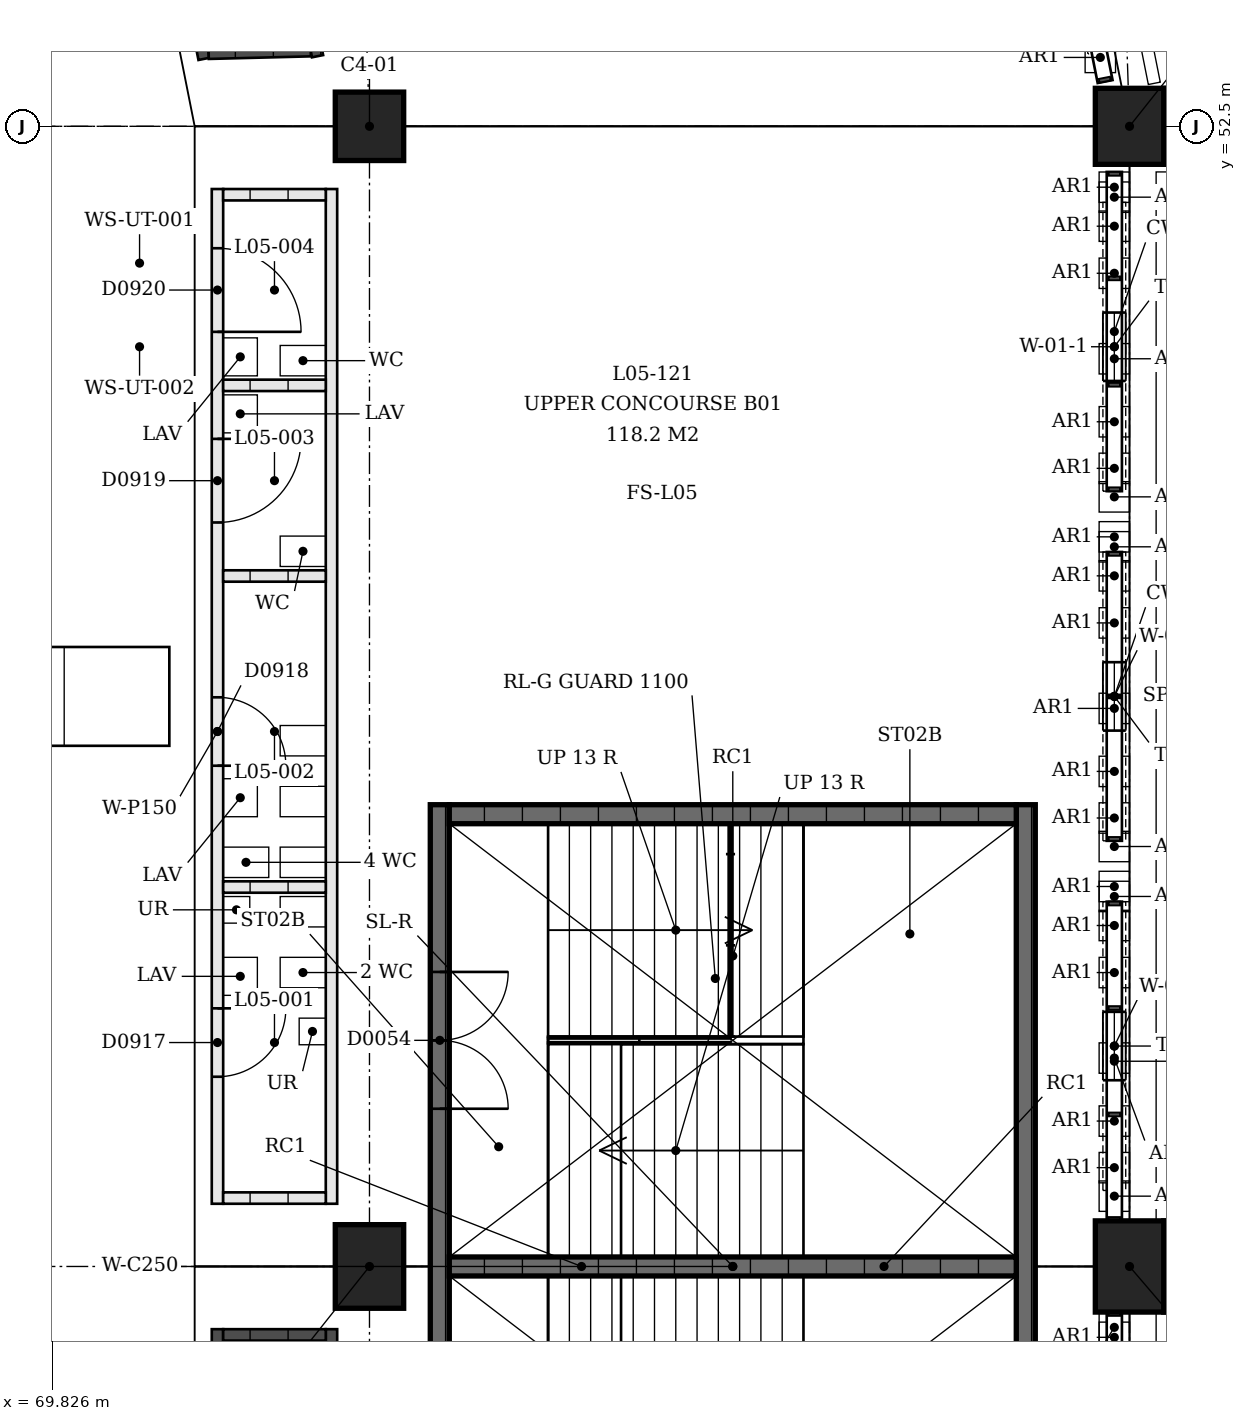
"""IFC4 building model, lengths in metres.
Left out: names, types, materials, properties, quantities, classifications, styles, units other than length and angle.
Written with IfcOpenShell. Run it as: python <this file> out.ifc"""

import sys

from ifc_helpers import new_model, si_unit, direction, frame, frame_2d, origin, origin_2d, place, context, subcontext, project, spatial, polyline, rectangle, outline, extrude, element, fill, save


model = new_model("IFC4")
c1 = context("Model", 3, precision=1e-05, world=origin(), true_north=direction((0.0, 1.0)))
c2 = subcontext(c1, "Body", "Model", "MODEL_VIEW")
j1 = project(units=[si_unit("LENGTHUNIT", "METRE"), si_unit("PLANEANGLEUNIT", "RADIAN")], contexts=[c1])
p1 = place(None, origin())
s1 = spatial("IfcSite", under=j1, at=p1, CompositionType="ELEMENT")
p2 = place(p1, origin())
s2 = spatial("IfcBuilding", under=s1, at=p2, CompositionType="ELEMENT")
p3 = place(p2, frame((0.0, 0.0, 22.5)))
s3 = spatial("IfcBuildingStorey", under=s2, at=p3, CompositionType="ELEMENT", Elevation=22.5)
p4 = place(p3, frame((74.0, 52.5, 0.0), z_axis=(0.0, 0.0, 1.0), x_axis=(0.0, 1.0, 0.0)))
e1 = element("IfcColumn", 1, at=p4, inside=s3, PredefinedType="COLUMN", context=c2, shape_type="SweptSolid", body=[
    extrude(rectangle(XDim=0.9, YDim=0.9, at=origin_2d()), origin(), (0.0, 0.0, 1.0), 6.5),
])
p5 = place(p3, frame((84.0, 52.5, 0.0), z_axis=(0.0, 0.0, 1.0), x_axis=(0.0, 1.0, 0.0)))
e2 = element("IfcColumn", 2, at=p5, inside=s3, PredefinedType="COLUMN", context=c2, shape_type="SweptSolid", body=[
    extrude(rectangle(XDim=1.0, YDim=0.9, at=origin_2d()), origin(), (0.0, 0.0, 1.0), 6.5),
])
p6 = place(p3, frame((74.0, 37.5, 0.0), z_axis=(0.0, 0.0, 1.0), x_axis=(0.0, 1.0, 0.0)))
e3 = element("IfcColumn", 3, at=p6, inside=s3, PredefinedType="COLUMN", context=c2, shape_type="SweptSolid", body=[
    extrude(rectangle(XDim=1.1, YDim=0.9, at=origin_2d()), origin(), (0.0, 0.0, 1.0), 6.5),
])
p7 = place(p3, frame((84.0, 37.5, 0.0), z_axis=(0.0, 0.0, 1.0), x_axis=(0.0, 1.0, 0.0)))
e4 = element("IfcColumn", 4, at=p7, inside=s3, PredefinedType="COLUMN", context=c2, shape_type="SweptSolid", body=[
    extrude(rectangle(XDim=1.2, YDim=0.9, at=origin_2d()), origin(), (0.0, 0.0, 1.0), 6.5),
])
p8 = place(p3, frame((83.8, 51.5, 4.1), z_axis=(0.0, 0.0, 1.0), x_axis=(0.0, -1.0, 0.0)))
e5 = element("IfcWall", 5, at=p8, inside=s3, PredefinedType="SOLIDWALL", context=c2, shape_type="SweptSolid", body=[
    extrude(outline(polyline([(0.0, 0.0), (3.8, 0.0), (3.8, 0.05), (3.676, 1.314), (3.308, 2.581), (2.709, 3.757), (1.9, 4.8), (1.091, 3.757), (0.492, 2.581), (0.124, 1.314), (0.0, 0.05), (0.0, 0.0)])), frame((0.0, 0.15, 0.0), z_axis=(0.0, -1.0, 0.0), x_axis=(1.0, 0.0, 0.0)), (0.0, 0.0, 1.0), 0.3),
])
p9 = place(p8, frame((1.45, 0.0, 0.4)))
e6 = element("IfcOpeningElement", 6, at=p9, cuts=e5, PredefinedType="OPENING", context=c2, shape_type="SweptSolid", body=[
    extrude(rectangle(XDim=0.9, YDim=3.6, at=frame_2d((0.45, 1.8))), frame((0.0, 0.16, 0.0), z_axis=(0.0, -1.0, 0.0), x_axis=(1.0, 0.0, 0.0)), (0.0, 0.0, 1.0), 0.32),
])
p10 = place(p3, frame((83.8, 46.9, 4.1), z_axis=(0.0, 0.0, 1.0), x_axis=(0.0, -1.0, 0.0)))
e7 = element("IfcWall", 7, at=p10, inside=s3, PredefinedType="SOLIDWALL", context=c2, shape_type="SweptSolid", body=[
    extrude(outline(polyline([(0.0, 0.0), (3.8, 0.0), (3.8, 0.05), (3.676, 1.314), (3.308, 2.581), (2.709, 3.757), (1.9, 4.8), (1.091, 3.757), (0.492, 2.581), (0.124, 1.314), (0.0, 0.05), (0.0, 0.0)])), frame((0.0, 0.15, 0.0), z_axis=(0.0, -1.0, 0.0), x_axis=(1.0, 0.0, 0.0)), (0.0, 0.0, 1.0), 0.3),
])
p11 = place(p10, frame((1.45, 0.0, 0.4)))
e8 = element("IfcOpeningElement", 8, at=p11, cuts=e7, PredefinedType="OPENING", context=c2, shape_type="SweptSolid", body=[
    extrude(rectangle(XDim=0.9, YDim=3.6, at=frame_2d((0.45, 1.8))), frame((0.0, 0.16, 0.0), z_axis=(0.0, -1.0, 0.0), x_axis=(1.0, 0.0, 0.0)), (0.0, 0.0, 1.0), 0.32),
])
p12 = place(p3, frame((83.8, 42.3, 4.1), z_axis=(0.0, 0.0, 1.0), x_axis=(0.0, -1.0, 0.0)))
e9 = element("IfcWall", 9, at=p12, inside=s3, PredefinedType="SOLIDWALL", context=c2, shape_type="SweptSolid", body=[
    extrude(outline(polyline([(0.0, 0.0), (3.8, 0.0), (3.8, 0.05), (3.676, 1.314), (3.308, 2.581), (2.709, 3.757), (1.9, 4.8), (1.091, 3.757), (0.492, 2.581), (0.124, 1.314), (0.0, 0.05), (0.0, 0.0)])), frame((0.0, 0.15, 0.0), z_axis=(0.0, -1.0, 0.0), x_axis=(1.0, 0.0, 0.0)), (0.0, 0.0, 1.0), 0.3),
])
p13 = place(p12, frame((1.45, 0.0, 0.4)))
e10 = element("IfcOpeningElement", 10, at=p13, cuts=e9, PredefinedType="OPENING", context=c2, shape_type="SweptSolid", body=[
    extrude(rectangle(XDim=0.9, YDim=3.6, at=frame_2d((0.45, 1.8))), frame((0.0, 0.16, 0.0), z_axis=(0.0, -1.0, 0.0), x_axis=(1.0, 0.0, 0.0)), (0.0, 0.0, 1.0), 0.32),
])
p14 = place(p3, frame((82.868, 57.166, 4.1), z_axis=(0.0, 0.0, 1.0), x_axis=(0.195078797665, -0.980787572669, 0.0)))
e11 = element("IfcWall", 11, at=p14, inside=s3, PredefinedType="SOLIDWALL", context=c2, shape_type="SweptSolid", body=[
    extrude(outline(polyline([(0.0, 0.0), (3.757, 0.0), (3.757, 0.05), (3.635, 1.311), (3.271, 2.577), (2.678, 3.754), (1.879, 4.8), (1.079, 3.754), (0.486, 2.577), (0.123, 1.311), (0.0, 0.05), (0.0, 0.0)])), frame((0.0, 0.15, 0.0), z_axis=(0.0, -1.0, 0.0), x_axis=(1.0, 0.0, 0.0)), (0.0, 0.0, 1.0), 0.3),
])
p15 = place(p14, frame((1.428, 0.0, 0.4)))
e12 = element("IfcOpeningElement", 12, at=p15, cuts=e11, PredefinedType="OPENING", context=c2, shape_type="SweptSolid", body=[
    extrude(rectangle(XDim=0.9, YDim=3.6, at=frame_2d((0.45, 1.8))), frame((0.0, 0.16, 0.0), z_axis=(0.0, -1.0, 0.0), x_axis=(1.0, 0.0, 0.0)), (0.0, 0.0, 1.0), 0.32),
])
p16 = place(p3, frame((74.925, 31.425, 0.0), z_axis=(0.0, 0.0, 1.0), x_axis=(0.0, 1.0, 0.0)))
e13 = element("IfcWall", 13, at=p16, inside=s3, PredefinedType="SHEAR", context=c2, shape_type="SweptSolid", body=[
    extrude(rectangle(XDim=12.15, YDim=0.25, at=frame_2d((6.075, 0.0))), origin(), (0.0, 0.0, 1.0), 2.1),
])
p17 = place(p16, frame((2.2, 0.0, 0.0)))
e14 = element("IfcOpeningElement", 14, at=p17, cuts=e13, PredefinedType="OPENING", context=c2, shape_type="SweptSolid", body=[
    extrude(rectangle(XDim=1.8, YDim=2.1, at=frame_2d((0.9, 1.05))), frame((0.0, 0.125, 0.0), z_axis=(0.0, -1.0, 0.0), x_axis=(1.0, 0.0, 0.0)), (0.0, 0.0, 1.0), 0.25),
])
p18 = place(p16, frame((8.15, 0.0, 0.0)))
e15 = element("IfcOpeningElement", 15, at=p18, cuts=e13, PredefinedType="OPENING", context=c2, shape_type="SweptSolid", body=[
    extrude(rectangle(XDim=1.8, YDim=2.1, at=frame_2d((0.9, 1.05))), frame((0.0, 0.125, 0.0), z_axis=(0.0, -1.0, 0.0), x_axis=(1.0, 0.0, 0.0)), (0.0, 0.0, 1.0), 0.25),
])
p19 = place(p3, frame((82.635, 31.425, 0.0), z_axis=(0.0, 0.0, 1.0), x_axis=(0.0, 1.0, 0.0)))
e16 = element("IfcWall", 16, at=p19, inside=s3, PredefinedType="SHEAR", context=c2, shape_type="SweptSolid", body=[
    extrude(rectangle(XDim=12.15, YDim=0.25, at=frame_2d((6.075, 0.0))), origin(), (0.0, 0.0, 1.0), 2.1),
])
for number, where, z_axis, x_axis in (
    (17, (75.05, 43.45, 0.0), (0.0, 0.0, 1.0), (1.0, 0.0, 0.0)),
    (18, (75.05, 37.5, 0.0), (0.0, 0.0, 1.0), (1.0, 0.0, 0.0)),
):
    element("IfcWall", number, at=place(p3, frame(where, z_axis=z_axis, x_axis=x_axis)), inside=s3, PredefinedType="SHEAR", context=c2, shape_type="SweptSolid", body=[
        extrude(rectangle(XDim=7.46, YDim=0.25, at=frame_2d((3.73, 0.0))), origin(), (0.0, 0.0, 1.0), 2.1),
    ])
p20 = place(p3, frame((72.0, 38.325, 0.0), z_axis=(0.0, 0.0, 1.0), x_axis=(0.0, 1.0, 0.0)))
e19 = element("IfcWall", 19, at=p20, inside=s3, PredefinedType="PARTITIONING", context=c2, shape_type="SweptSolid", body=[
    extrude(rectangle(XDim=13.35, YDim=0.15, at=frame_2d((6.675, 0.0))), origin(), (0.0, 0.0, 1.0), 3.0),
])
p21 = place(p20, frame((1.671, 0.0, 0.0)))
e20 = element("IfcOpeningElement", 20, at=p21, cuts=e19, PredefinedType="OPENING", context=c2, shape_type="SweptSolid", body=[
    extrude(rectangle(XDim=0.9, YDim=2.1, at=frame_2d((0.45, 1.05))), frame((0.0, 0.075, 0.0), z_axis=(0.0, -1.0, 0.0), x_axis=(1.0, 0.0, 0.0)), (0.0, 0.0, 1.0), 0.15),
])
p22 = place(p20, frame((5.763, 0.0, 0.0)))
e21 = element("IfcOpeningElement", 21, at=p22, cuts=e19, PredefinedType="OPENING", context=c2, shape_type="SweptSolid", body=[
    extrude(rectangle(XDim=0.9, YDim=2.1, at=frame_2d((0.45, 1.05))), frame((0.0, 0.075, 0.0), z_axis=(0.0, -1.0, 0.0), x_axis=(1.0, 0.0, 0.0)), (0.0, 0.0, 1.0), 0.15),
])
p23 = place(p20, frame((8.963, 0.0, 0.0)))
e22 = element("IfcOpeningElement", 22, at=p23, cuts=e19, PredefinedType="OPENING", context=c2, shape_type="SweptSolid", body=[
    extrude(rectangle(XDim=1.1, YDim=2.1, at=frame_2d((0.55, 1.05))), frame((0.0, 0.075, 0.0), z_axis=(0.0, -1.0, 0.0), x_axis=(1.0, 0.0, 0.0)), (0.0, 0.0, 1.0), 0.15),
])
p24 = place(p20, frame((11.471, 0.0, 0.0)))
e23 = element("IfcOpeningElement", 23, at=p24, cuts=e19, PredefinedType="OPENING", context=c2, shape_type="SweptSolid", body=[
    extrude(rectangle(XDim=1.1, YDim=2.1, at=frame_2d((0.55, 1.05))), frame((0.0, 0.075, 0.0), z_axis=(0.0, -1.0, 0.0), x_axis=(1.0, 0.0, 0.0)), (0.0, 0.0, 1.0), 0.15),
])
p25 = place(p3, frame((73.5, 38.325, 0.0), z_axis=(0.0, 0.0, 1.0), x_axis=(0.0, 1.0, 0.0)))
e24 = element("IfcWall", 24, at=p25, inside=s3, PredefinedType="PARTITIONING", context=c2, shape_type="SweptSolid", body=[
    extrude(rectangle(XDim=13.35, YDim=0.15, at=frame_2d((6.675, 0.0))), origin(), (0.0, 0.0, 1.0), 3.0),
])
for number, where, z_axis, x_axis in (
    (25, (72.075, 38.4, 0.0), (0.0, 0.0, 1.0), (1.0, 0.0, 0.0)),
    (26, (72.075, 42.492, 0.0), (0.0, 0.0, 1.0), (1.0, 0.0, 0.0)),
    (27, (72.075, 46.584, 0.0), (0.0, 0.0, 1.0), (1.0, 0.0, 0.0)),
    (28, (72.075, 49.092, 0.0), (0.0, 0.0, 1.0), (1.0, 0.0, 0.0)),
    (29, (72.075, 51.6, 0.0), (0.0, 0.0, 1.0), (1.0, 0.0, 0.0)),
):
    element("IfcWall", number, at=place(p3, frame(where, z_axis=z_axis, x_axis=x_axis)), inside=s3, PredefinedType="PARTITIONING", context=c2, shape_type="SweptSolid", body=[
        extrude(rectangle(XDim=1.35, YDim=0.15, at=frame_2d((0.675, 0.0))), origin(), (0.0, 0.0, 1.0), 3.0),
    ])
p26 = place(p3, frame((72.0, 36.675, 0.0), z_axis=(0.0, 0.0, 1.0), x_axis=(0.0, -1.0, 0.0)))
e30 = element("IfcWall", 30, at=p26, inside=s3, PredefinedType="SOLIDWALL", context=c2, shape_type="SweptSolid", body=[
    extrude(rectangle(XDim=13.35, YDim=0.15, at=frame_2d((6.675, 0.0))), origin(), (0.0, 0.0, 1.0), 3.0),
])
p27 = place(p26, frame((2.875, 0.0, 0.0)))
e31 = element("IfcOpeningElement", 31, at=p27, cuts=e30, PredefinedType="OPENING", context=c2, shape_type="SweptSolid", body=[
    extrude(rectangle(XDim=1.0, YDim=2.1, at=frame_2d((0.5, 1.05))), frame((0.0, 0.075, 0.0), z_axis=(0.0, -1.0, 0.0), x_axis=(1.0, 0.0, 0.0)), (0.0, 0.0, 1.0), 0.15),
])
p28 = place(p26, frame((9.475, 0.0, 0.0)))
e32 = element("IfcOpeningElement", 32, at=p28, cuts=e30, PredefinedType="OPENING", context=c2, shape_type="SweptSolid", body=[
    extrude(rectangle(XDim=1.0, YDim=2.1, at=frame_2d((0.5, 1.05))), frame((0.0, 0.075, 0.0), z_axis=(0.0, -1.0, 0.0), x_axis=(1.0, 0.0, 0.0)), (0.0, 0.0, 1.0), 0.15),
])
p29 = place(p3, frame((73.5, 36.675, 0.0), z_axis=(0.0, 0.0, 1.0), x_axis=(0.0, -1.0, 0.0)))
e33 = element("IfcWall", 33, at=p29, inside=s3, PredefinedType="SOLIDWALL", context=c2, shape_type="SweptSolid", body=[
    extrude(rectangle(XDim=13.35, YDim=0.15, at=frame_2d((6.675, 0.0))), origin(), (0.0, 0.0, 1.0), 3.0),
])
p30 = place(p3, frame((72.075, 36.6, 0.0), z_axis=(0.0, 0.0, 1.0), x_axis=(1.0, 0.0, 0.0)))
e34 = element("IfcWall", 34, at=p30, inside=s3, PredefinedType="SOLIDWALL", context=c2, shape_type="SweptSolid", body=[
    extrude(rectangle(XDim=1.35, YDim=0.15, at=frame_2d((0.675, 0.0))), origin(), (0.0, 0.0, 1.0), 3.0),
])
p31 = place(p3, frame((69.265, 66.249, 0.0), z_axis=(0.0, 0.0, 1.0), x_axis=(0.195095631841, -0.980784224198, 0.0)))
e35 = element("IfcWall", 35, at=p31, inside=s3, PredefinedType="SOLIDWALL", context=c2, shape_type="SweptSolid", body=[
    extrude(rectangle(XDim=13.113, YDim=0.15, at=frame_2d((6.557, 0.0))), origin(), (0.0, 0.0, 1.0), 3.0),
])
p32 = place(p31, frame((2.815, 0.0, 0.0)))
e36 = element("IfcOpeningElement", 36, at=p32, cuts=e35, PredefinedType="OPENING", context=c2, shape_type="SweptSolid", body=[
    extrude(rectangle(XDim=1.0, YDim=2.1, at=frame_2d((0.5, 1.05))), frame((0.0, 0.075, 0.0), z_axis=(0.0, -1.0, 0.0), x_axis=(1.0, 0.0, 0.0)), (0.0, 0.0, 1.0), 0.15),
])
p33 = place(p31, frame((9.298, 0.0, 0.0)))
e37 = element("IfcOpeningElement", 37, at=p33, cuts=e35, PredefinedType="OPENING", context=c2, shape_type="SweptSolid", body=[
    extrude(rectangle(XDim=1.0, YDim=2.1, at=frame_2d((0.5, 1.05))), frame((0.0, 0.075, 0.0), z_axis=(0.0, -1.0, 0.0), x_axis=(1.0, 0.0, 0.0)), (0.0, 0.0, 1.0), 0.15),
])
p34 = place(p3, frame((70.657, 66.791, 0.0), z_axis=(0.0, 0.0, 1.0), x_axis=(0.195103376128, -0.980782683689, 0.0)))
e38 = element("IfcWall", 38, at=p34, inside=s3, PredefinedType="SOLIDWALL", context=c2, shape_type="SweptSolid", body=[
    extrude(rectangle(XDim=13.631, YDim=0.15, at=frame_2d((6.815, 0.0))), origin(), (0.0, 0.0, 1.0), 3.0),
])
p35 = place(p3, frame((71.884, 53.461, 0.0), z_axis=(0.0, 0.0, 1.0), x_axis=(0.999681029438, 0.025255482205, 0.0)))
e39 = element("IfcWall", 39, at=p35, inside=s3, PredefinedType="SOLIDWALL", context=c2, shape_type="SweptSolid", body=[
    extrude(rectangle(XDim=1.344, YDim=0.15, at=frame_2d((0.672, 0.0))), origin(), (0.0, 0.0, 1.0), 3.0),
])
p36 = place(p9, origin())
e40 = element("IfcWindow", 40, at=p36, inside=s3, PartitioningType="SINGLE_PANEL", PredefinedType="WINDOW", context=c2, shape_type="SweptSolid", body=[
    extrude(rectangle(XDim=0.9, YDim=3.6, at=frame_2d((0.45, 1.8))), frame((0.0, 0.03, 0.0), z_axis=(0.0, -1.0, 0.0), x_axis=(1.0, 0.0, 0.0)), (0.0, 0.0, 1.0), 0.06),
])
fill(e6, e40)
p37 = place(p11, origin())
e41 = element("IfcWindow", 41, at=p37, inside=s3, PartitioningType="SINGLE_PANEL", PredefinedType="WINDOW", context=c2, shape_type="SweptSolid", body=[
    extrude(rectangle(XDim=0.9, YDim=3.6, at=frame_2d((0.45, 1.8))), frame((0.0, 0.03, 0.0), z_axis=(0.0, -1.0, 0.0), x_axis=(1.0, 0.0, 0.0)), (0.0, 0.0, 1.0), 0.06),
])
fill(e8, e41)
p38 = place(p13, origin())
e42 = element("IfcWindow", 42, at=p38, inside=s3, PartitioningType="SINGLE_PANEL", PredefinedType="WINDOW", context=c2, shape_type="SweptSolid", body=[
    extrude(rectangle(XDim=0.9, YDim=3.6, at=frame_2d((0.45, 1.8))), frame((0.0, 0.03, 0.0), z_axis=(0.0, -1.0, 0.0), x_axis=(1.0, 0.0, 0.0)), (0.0, 0.0, 1.0), 0.06),
])
fill(e10, e42)
p39 = place(p18, origin())
e43 = element("IfcDoor", 43, at=p39, inside=s3, OperationType="DOUBLE_DOOR_SINGLE_SWING", PredefinedType="DOOR", context=c2, shape_type="SweptSolid", body=[
    extrude(rectangle(XDim=1.8, YDim=2.1, at=frame_2d((0.9, 1.05))), frame((0.0, 0.025, 0.0), z_axis=(0.0, -1.0, 0.0), x_axis=(1.0, 0.0, 0.0)), (0.0, 0.0, 1.0), 0.05),
])
fill(e15, e43)
p40 = place(p21, origin())
e44 = element("IfcDoor", 44, at=p40, inside=s3, OperationType="SINGLE_SWING_RIGHT", PredefinedType="DOOR", context=c2, shape_type="SweptSolid", body=[
    extrude(rectangle(XDim=0.9, YDim=2.1, at=frame_2d((0.45, 1.05))), frame((0.0, 0.025, 0.0), z_axis=(0.0, -1.0, 0.0), x_axis=(1.0, 0.0, 0.0)), (0.0, 0.0, 1.0), 0.05),
])
fill(e20, e44)
p41 = place(p22, origin())
e45 = element("IfcDoor", 45, at=p41, inside=s3, OperationType="SINGLE_SWING_LEFT", PredefinedType="DOOR", context=c2, shape_type="SweptSolid", body=[
    extrude(rectangle(XDim=0.9, YDim=2.1, at=frame_2d((0.45, 1.05))), frame((0.0, 0.025, 0.0), z_axis=(0.0, -1.0, 0.0), x_axis=(1.0, 0.0, 0.0)), (0.0, 0.0, 1.0), 0.05),
])
fill(e21, e45)
p42 = place(p23, origin())
e46 = element("IfcDoor", 46, at=p42, inside=s3, OperationType="SINGLE_SWING_RIGHT", PredefinedType="DOOR", context=c2, shape_type="SweptSolid", body=[
    extrude(rectangle(XDim=1.1, YDim=2.1, at=frame_2d((0.55, 1.05))), frame((0.0, 0.025, 0.0), z_axis=(0.0, -1.0, 0.0), x_axis=(1.0, 0.0, 0.0)), (0.0, 0.0, 1.0), 0.05),
])
fill(e22, e46)
p43 = place(p24, origin())
e47 = element("IfcDoor", 47, at=p43, inside=s3, OperationType="SINGLE_SWING_LEFT", PredefinedType="DOOR", context=c2, shape_type="SweptSolid", body=[
    extrude(rectangle(XDim=1.1, YDim=2.1, at=frame_2d((0.55, 1.05))), frame((0.0, 0.025, 0.0), z_axis=(0.0, -1.0, 0.0), x_axis=(1.0, 0.0, 0.0)), (0.0, 0.0, 1.0), 0.05),
])
fill(e23, e47)
save(model, sys.argv[1])
